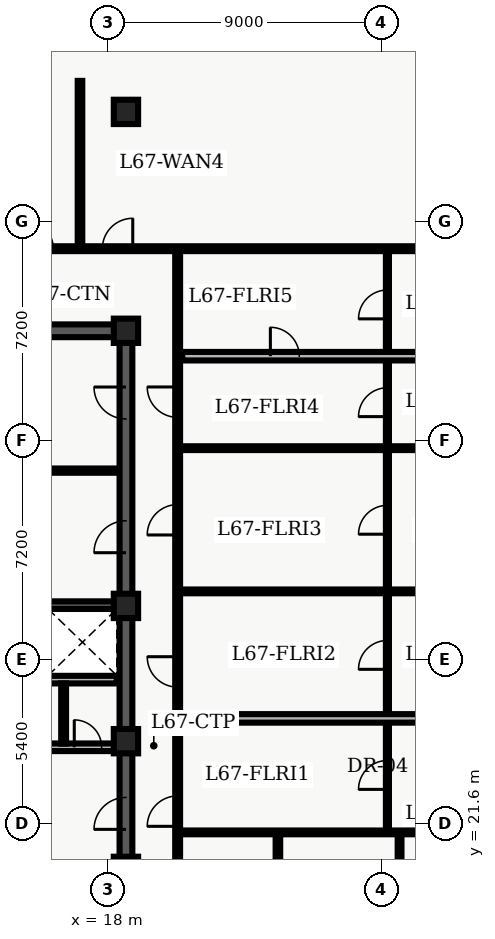
"""IFC4 building model, lengths in metres.
Left out: names, types, materials, properties, quantities, classifications, styles, units other than length and angle.
Written with IfcOpenShell. Run it as: python <this file> out.ifc"""

import sys

from ifc_helpers import new_model, entity, si_unit, converted_unit, direction, frame, origin_with_axes, origin_2d_with_axis, place, context, subcontext, project, spatial, polyline, rectangle, outline, extrude, element, fill, save


model = new_model("IFC4")
c1 = context("Model", 3, precision=1e-05, world=origin_with_axes(), true_north=direction((0.0, 1.0)))
c2 = subcontext(c1, "Body", "Model", "MODEL_VIEW")
j1 = project(units=[si_unit("LENGTHUNIT", "METRE"), converted_unit("PLANEANGLEUNIT", "DEGREE", entity("IfcPlaneAngleMeasure", 0.017), si_unit("PLANEANGLEUNIT", "RADIAN"), dimensions=[0, 0, 0, 0, 0, 0, 0])], contexts=[c1])
p1 = place(None, origin_with_axes())
s1 = spatial("IfcSite", under=j1, at=p1, CompositionType="ELEMENT")
p2 = place(p1, origin_with_axes())
s2 = spatial("IfcBuilding", under=s1, at=p2, CompositionType="ELEMENT")
p3 = place(p2, frame((0.0, 0.0, 272.4), z_axis=(0.0, 0.0, 1.0), x_axis=(1.0, 0.0, 0.0)))
s3 = spatial("IfcBuildingStorey", under=s2, at=p3, CompositionType="ELEMENT", Elevation=272.4)
p4 = place(p3, frame((11.4, 37.8, 0.0), z_axis=(0.0, 0.0, 1.0), x_axis=(1.0, 0.0, 0.0)))
e1 = element("IfcWall", 1, at=p4, inside=s3, PredefinedType="SHEAR", context=c2, shape_type="SweptSolid", body=[
    extrude(outline(polyline([(0.0, -0.21), (7.2, -0.21), (7.2, 0.21), (0.0, 0.21), (0.0, -0.21)])), origin_with_axes(), (0.0, 0.0, 1.0), 3.66),
])
p5 = place(p4, frame((2.625, 0.0, 0.0), z_axis=(0.0, 0.0, 1.0), x_axis=(1.0, 0.0, 0.0)))
e2 = element("IfcOpeningElement", 2, at=p5, cuts=e1, PredefinedType="OPENING", context=c2, shape_type="SweptSolid", body=[
    extrude(rectangle(XDim=1.05, YDim=0.44, at=origin_2d_with_axis()), origin_with_axes(), (0.0, 0.0, 1.0), 2.15),
])
p6 = place(p3, frame((18.6, 10.8, 0.0), z_axis=(0.0, 0.0, 1.0), x_axis=(0.0, 1.0, 0.0)))
e3 = element("IfcWall", 3, at=p6, inside=s3, PredefinedType="SHEAR", context=c2, shape_type="SweptSolid", body=[
    extrude(outline(polyline([(0.0, -0.21), (13.5, -0.21), (13.5, 0.21), (0.0, 0.21), (0.0, -0.21)])), origin_with_axes(), (0.0, 0.0, 1.0), 3.66),
])
p7 = place(p6, frame((1.3, 0.0, 0.0), z_axis=(0.0, 0.0, 1.0), x_axis=(1.0, 0.0, 0.0)))
e4 = element("IfcOpeningElement", 4, at=p7, cuts=e3, PredefinedType="OPENING", context=c2, shape_type="SweptSolid", body=[
    extrude(rectangle(XDim=1.1, YDim=0.44, at=origin_2d_with_axis()), origin_with_axes(), (0.0, 0.0, 1.0), 2.15),
])
p8 = place(p6, frame((3.4, 0.0, 0.0), z_axis=(0.0, 0.0, 1.0), x_axis=(1.0, 0.0, 0.0)))
e5 = element("IfcOpeningElement", 5, at=p8, cuts=e3, PredefinedType="OPENING", context=c2, shape_type="SweptSolid", body=[
    extrude(rectangle(XDim=1.1, YDim=0.44, at=origin_2d_with_axis()), origin_with_axes(), (0.0, 0.0, 1.0), 2.15),
])
p9 = place(p6, frame((11.125, 0.0, 0.0), z_axis=(0.0, 0.0, 1.0), x_axis=(1.0, 0.0, 0.0)))
e6 = element("IfcOpeningElement", 6, at=p9, cuts=e3, PredefinedType="OPENING", context=c2, shape_type="SweptSolid", body=[
    extrude(rectangle(XDim=1.05, YDim=0.44, at=origin_2d_with_axis()), origin_with_axes(), (0.0, 0.0, 1.0), 2.15),
])
p10 = place(p6, frame((6.675, 0.0, 0.0), z_axis=(0.0, 0.0, 1.0), x_axis=(1.0, 0.0, 0.0)))
e7 = element("IfcOpeningElement", 7, at=p10, cuts=e3, PredefinedType="OPENING", context=c2, shape_type="SweptSolid", body=[
    extrude(rectangle(XDim=0.95, YDim=0.44, at=origin_2d_with_axis()), origin_with_axes(), (0.0, 0.0, 1.0), 2.15),
])
p11 = place(p3, frame((18.6, 24.3, 0.0), z_axis=(0.0, 0.0, 1.0), x_axis=(0.0, 1.0, 0.0)))
e8 = element("IfcWall", 8, at=p11, inside=s3, PredefinedType="SHEAR", context=c2, shape_type="SweptSolid", body=[
    extrude(outline(polyline([(0.0, -0.21), (13.5, -0.21), (13.5, 0.21), (0.0, 0.21), (0.0, -0.21)])), origin_with_axes(), (0.0, 0.0, 1.0), 3.66),
])
p12 = place(p11, frame((6.725, 0.0, 0.0), z_axis=(0.0, 0.0, 1.0), x_axis=(1.0, 0.0, 0.0)))
e9 = element("IfcOpeningElement", 9, at=p12, cuts=e8, PredefinedType="OPENING", context=c2, shape_type="SweptSolid", body=[
    extrude(rectangle(XDim=1.05, YDim=0.44, at=origin_2d_with_axis()), origin_with_axes(), (0.0, 0.0, 1.0), 2.15),
])
p13 = place(p11, frame((11.125, 0.0, 0.0), z_axis=(0.0, 0.0, 1.0), x_axis=(1.0, 0.0, 0.0)))
e10 = element("IfcOpeningElement", 10, at=p13, cuts=e8, PredefinedType="OPENING", context=c2, shape_type="SweptSolid", body=[
    extrude(rectangle(XDim=1.05, YDim=0.44, at=origin_2d_with_axis()), origin_with_axes(), (0.0, 0.0, 1.0), 2.15),
])
p14 = place(p3, frame((11.61, 28.775, 0.0), z_axis=(0.0, 0.0, 1.0), x_axis=(1.0, 0.0, 0.0)))
e11 = element("IfcWall", 11, at=p14, inside=s3, PredefinedType="SHEAR", context=c2, shape_type="SweptSolid", body=[
    extrude(outline(polyline([(0.0, -0.125), (6.78, -0.125), (6.78, 0.125), (0.0, 0.125), (0.0, -0.125)])), origin_with_axes(), (0.0, 0.0, 1.0), 3.66),
])
p15 = place(p3, frame((11.7, 24.1, 0.0), z_axis=(0.0, 0.0, 1.0), x_axis=(1.0, 0.0, 0.0)))
e12 = element("IfcWall", 12, at=p15, inside=s3, PredefinedType="SOLIDWALL", context=c2, shape_type="SweptSolid", body=[
    extrude(outline(polyline([(0.0, -0.125), (6.6, -0.125), (6.6, 0.125), (0.0, 0.125), (0.0, -0.125)])), origin_with_axes(), (0.0, 0.0, 1.0), 2.7),
])
p16 = place(p15, frame((3.6, 0.0, 0.0), z_axis=(0.0, 0.0, 1.0), x_axis=(1.0, 0.0, 0.0)))
e13 = element("IfcOpeningElement", 13, at=p16, cuts=e12, PredefinedType="OPENING", context=c2, shape_type="SweptSolid", body=[
    extrude(rectangle(XDim=0.9, YDim=0.27, at=origin_2d_with_axis()), origin_with_axes(), (0.0, 0.0, 1.0), 2.15),
])
p17 = place(p15, frame((5.65, 0.0, 0.0), z_axis=(0.0, 0.0, 1.0), x_axis=(1.0, 0.0, 0.0)))
e14 = element("IfcOpeningElement", 14, at=p17, cuts=e12, PredefinedType="OPENING", context=c2, shape_type="SweptSolid", body=[
    extrude(rectangle(XDim=0.9, YDim=0.27, at=origin_2d_with_axis()), origin_with_axes(), (0.0, 0.0, 1.0), 2.15),
])
p18 = place(p3, frame((11.7, 26.325, 0.0), z_axis=(0.0, 0.0, 1.0), x_axis=(1.0, 0.0, 0.0)))
e15 = element("IfcWall", 15, at=p18, inside=s3, PredefinedType="SOLIDWALL", context=c2, shape_type="SweptSolid", body=[
    extrude(outline(polyline([(0.0, -0.125), (6.6, -0.125), (6.6, 0.125), (0.0, 0.125), (0.0, -0.125)])), origin_with_axes(), (0.0, 0.0, 1.0), 2.7),
])
p19 = place(p18, frame((3.5, 0.0, 0.0), z_axis=(0.0, 0.0, 1.0), x_axis=(1.0, 0.0, 0.0)))
e16 = element("IfcOpeningElement", 16, at=p19, cuts=e15, PredefinedType="OPENING", context=c2, shape_type="SweptSolid", body=[
    extrude(rectangle(XDim=0.9, YDim=0.27, at=origin_2d_with_axis()), origin_with_axes(), (0.0, 0.0, 1.0), 2.15),
])
for number, where, z_axis, x_axis in (
    (17, (18.6, 20.1, 0.0), (0.0, 0.0, 1.0), (1.0, 0.0, 0.0)),
    (18, (18.6, 24.3, 0.0), (0.0, 0.0, 1.0), (1.0, 0.0, 0.0)),
    (19, (18.6, 28.75, 0.0), (0.0, 0.0, 1.0), (1.0, 0.0, 0.0)),
    (20, (18.6, 37.8, 0.0), (0.0, 0.0, 1.0), (1.0, 0.0, 0.0)),
    (21, (18.6, 45.0, 0.0), (0.0, 0.0, 1.0), (1.0, 0.0, 0.0)),
):
    element("IfcColumn", number, at=place(p3, frame(where, z_axis=z_axis, x_axis=x_axis)), inside=s3, PredefinedType="COLUMN", context=c2, shape_type="SweptSolid", body=[
        extrude(rectangle(XDim=0.8, YDim=0.8, at=origin_2d_with_axis()), origin_with_axes(), (0.0, 0.0, 1.0), 3.9),
    ])
p20 = place(p3, frame((16.55, 24.22, 0.0), z_axis=(0.0, 0.0, 1.0), x_axis=(0.0, 1.0, 0.0)))
e22 = element("IfcWall", 22, at=p20, inside=s3, PredefinedType="PARTITIONING", context=c2, shape_type="SweptSolid", body=[
    extrude(outline(polyline([(0.0, -0.08), (1.98, -0.08), (1.98, 0.08), (0.0, 0.08), (0.0, -0.08)])), origin_with_axes(), (0.0, 0.0, 1.0), 2.7),
])
p21 = place(p3, frame((15.84, 33.2, 0.0), z_axis=(0.0, 0.0, 1.0), x_axis=(1.0, 0.0, 0.0)))
e23 = element("IfcWall", 23, at=p21, inside=s3, PredefinedType="PARTITIONING", context=c2, shape_type="SweptSolid", body=[
    extrude(outline(polyline([(0.0, -0.07), (2.46, -0.07), (2.46, 0.07), (0.0, 0.07), (0.0, -0.07)])), origin_with_axes(), (0.0, 0.0, 1.0), 2.7),
])
p22 = place(p3, frame((8.135, 40.5, 0.0), z_axis=(0.0, 0.0, 1.0), x_axis=(1.0, 0.0, 0.0)))
e24 = element("IfcWall", 24, at=p22, inside=s3, PredefinedType="PARTITIONING", context=c2, shape_type="SweptSolid", body=[
    extrude(outline(polyline([(0.0, -0.08), (23.93, -0.08), (23.93, 0.08), (0.0, 0.08), (0.0, -0.08)])), origin_with_axes(), (0.0, 0.0, 1.0), 2.7),
])
p23 = place(p22, frame((0.76, 0.0, 0.0), z_axis=(0.0, 0.0, 1.0), x_axis=(1.0, 0.0, 0.0)))
e25 = element("IfcOpeningElement", 25, at=p23, cuts=e24, PredefinedType="OPENING", context=c2, shape_type="SweptSolid", body=[
    extrude(rectangle(XDim=1.0, YDim=0.18, at=origin_2d_with_axis()), origin_with_axes(), (0.0, 0.0, 1.0), 2.15),
])
p24 = place(p22, frame((4.729, 0.0, 0.0), z_axis=(0.0, 0.0, 1.0), x_axis=(1.0, 0.0, 0.0)))
e26 = element("IfcOpeningElement", 26, at=p24, cuts=e24, PredefinedType="OPENING", context=c2, shape_type="SweptSolid", body=[
    extrude(rectangle(XDim=1.0, YDim=0.18, at=origin_2d_with_axis()), origin_with_axes(), (0.0, 0.0, 1.0), 2.15),
])
p25 = place(p22, frame((7.574, 0.0, 0.0), z_axis=(0.0, 0.0, 1.0), x_axis=(1.0, 0.0, 0.0)))
e27 = element("IfcOpeningElement", 27, at=p25, cuts=e24, PredefinedType="OPENING", context=c2, shape_type="SweptSolid", body=[
    extrude(rectangle(XDim=1.0, YDim=0.18, at=origin_2d_with_axis()), origin_with_axes(), (0.0, 0.0, 1.0), 2.15),
])
p26 = place(p22, frame((10.189, 0.0, 0.0), z_axis=(0.0, 0.0, 1.0), x_axis=(1.0, 0.0, 0.0)))
e28 = element("IfcOpeningElement", 28, at=p26, cuts=e24, PredefinedType="OPENING", context=c2, shape_type="SweptSolid", body=[
    extrude(rectangle(XDim=1.0, YDim=0.18, at=origin_2d_with_axis()), origin_with_axes(), (0.0, 0.0, 1.0), 2.15),
])
p27 = place(p3, frame((20.3, 7.8, 0.0), z_axis=(0.0, 0.0, 1.0), x_axis=(0.0, 1.0, 0.0)))
e29 = element("IfcWall", 29, at=p27, inside=s3, PredefinedType="PARTITIONING", context=c2, shape_type="SweptSolid", body=[
    extrude(outline(polyline([(0.0, -0.08), (32.7, -0.08), (32.7, 0.08), (0.0, 0.08), (0.0, -0.08)])), origin_with_axes(), (0.0, 0.0, 1.0), 2.7),
])
p28 = place(p27, frame((14.2, 0.0, 0.0), z_axis=(0.0, 0.0, 1.0), x_axis=(1.0, 0.0, 0.0)))
e30 = element("IfcOpeningElement", 30, at=p28, cuts=e29, PredefinedType="OPENING", context=c2, shape_type="SweptSolid", body=[
    extrude(rectangle(XDim=1.0, YDim=0.18, at=origin_2d_with_axis()), origin_with_axes(), (0.0, 0.0, 1.0), 2.15),
])
p29 = place(p27, frame((18.779, 0.0, 0.0), z_axis=(0.0, 0.0, 1.0), x_axis=(1.0, 0.0, 0.0)))
e31 = element("IfcOpeningElement", 31, at=p29, cuts=e29, PredefinedType="OPENING", context=c2, shape_type="SweptSolid", body=[
    extrude(rectangle(XDim=1.0, YDim=0.18, at=origin_2d_with_axis()), origin_with_axes(), (0.0, 0.0, 1.0), 2.15),
])
p30 = place(p27, frame((23.784, 0.0, 0.0), z_axis=(0.0, 0.0, 1.0), x_axis=(1.0, 0.0, 0.0)))
e32 = element("IfcOpeningElement", 32, at=p30, cuts=e29, PredefinedType="OPENING", context=c2, shape_type="SweptSolid", body=[
    extrude(rectangle(XDim=1.0, YDim=0.18, at=origin_2d_with_axis()), origin_with_axes(), (0.0, 0.0, 1.0), 2.15),
])
p31 = place(p27, frame((27.651, 0.0, 0.0), z_axis=(0.0, 0.0, 1.0), x_axis=(1.0, 0.0, 0.0)))
e33 = element("IfcOpeningElement", 33, at=p31, cuts=e29, PredefinedType="OPENING", context=c2, shape_type="SweptSolid", body=[
    extrude(rectangle(XDim=1.0, YDim=0.18, at=origin_2d_with_axis()), origin_with_axes(), (0.0, 0.0, 1.0), 2.15),
])
p32 = place(p27, frame((5.475, 0.0, 0.0), z_axis=(0.0, 0.0, 1.0), x_axis=(1.0, 0.0, 0.0)))
e34 = element("IfcOpeningElement", 34, at=p32, cuts=e29, PredefinedType="OPENING", context=c2, shape_type="SweptSolid", body=[
    extrude(rectangle(XDim=1.05, YDim=0.18, at=origin_2d_with_axis()), origin_with_axes(), (0.0, 0.0, 1.0), 2.15),
])
p33 = place(p3, frame((17.088, 40.6, 0.0), z_axis=(0.0, 0.0, 1.0), x_axis=(0.0, 1.0, 0.0)))
e35 = element("IfcWall", 35, at=p33, inside=s3, PredefinedType="PARTITIONING", context=c2, shape_type="SweptSolid", body=[
    extrude(outline(polyline([(0.0, -0.075), (5.42, -0.075), (5.42, 0.075), (0.0, 0.075), (0.0, -0.075)])), origin_with_axes(), (0.0, 0.0, 1.0), 2.7),
])
p34 = place(p3, frame((27.2, 21.4, 0.0), z_axis=(0.0, 0.0, 1.0), x_axis=(0.0, 1.0, 0.0)))
e36 = element("IfcWall", 36, at=p34, inside=s3, PredefinedType="PARTITIONING", context=c2, shape_type="SweptSolid", body=[
    extrude(outline(polyline([(0.0, -0.05), (18.9, -0.05), (18.9, 0.05), (0.0, 0.05), (0.0, -0.05)])), origin_with_axes(), (0.0, 0.0, 1.0), 2.7),
])
p35 = place(p34, frame((1.79, 0.0, 0.0), z_axis=(0.0, 0.0, 1.0), x_axis=(1.0, 0.0, 0.0)))
e37 = element("IfcOpeningElement", 37, at=p35, cuts=e36, PredefinedType="OPENING", context=c2, shape_type="SweptSolid", body=[
    extrude(rectangle(XDim=0.95, YDim=0.12, at=origin_2d_with_axis()), origin_with_axes(), (0.0, 0.0, 1.0), 2.15),
])
p36 = place(p34, frame((5.739, 0.0, 0.0), z_axis=(0.0, 0.0, 1.0), x_axis=(1.0, 0.0, 0.0)))
e38 = element("IfcOpeningElement", 38, at=p36, cuts=e36, PredefinedType="OPENING", context=c2, shape_type="SweptSolid", body=[
    extrude(rectangle(XDim=0.95, YDim=0.12, at=origin_2d_with_axis()), origin_with_axes(), (0.0, 0.0, 1.0), 2.15),
])
p37 = place(p34, frame((10.184, 0.0, 0.0), z_axis=(0.0, 0.0, 1.0), x_axis=(1.0, 0.0, 0.0)))
e39 = element("IfcOpeningElement", 39, at=p37, cuts=e36, PredefinedType="OPENING", context=c2, shape_type="SweptSolid", body=[
    extrude(rectangle(XDim=0.95, YDim=0.12, at=origin_2d_with_axis()), origin_with_axes(), (0.0, 0.0, 1.0), 2.15),
])
p38 = place(p34, frame((14.052, 0.0, 0.0), z_axis=(0.0, 0.0, 1.0), x_axis=(1.0, 0.0, 0.0)))
e40 = element("IfcOpeningElement", 40, at=p38, cuts=e36, PredefinedType="OPENING", context=c2, shape_type="SweptSolid", body=[
    extrude(rectangle(XDim=0.95, YDim=0.12, at=origin_2d_with_axis()), origin_with_axes(), (0.0, 0.0, 1.0), 2.15),
])
p39 = place(p34, frame((17.267, 0.0, 0.0), z_axis=(0.0, 0.0, 1.0), x_axis=(1.0, 0.0, 0.0)))
e41 = element("IfcOpeningElement", 41, at=p39, cuts=e36, PredefinedType="OPENING", context=c2, shape_type="SweptSolid", body=[
    extrude(rectangle(XDim=0.95, YDim=0.12, at=origin_2d_with_axis()), origin_with_axes(), (0.0, 0.0, 1.0), 2.15),
])
p40 = place(p3, frame((20.45, 25.05, 0.0), z_axis=(0.0, 0.0, 1.0), x_axis=(1.0, 0.0, 0.0)))
e42 = element("IfcWall", 42, at=p40, inside=s3, PredefinedType="PARTITIONING", context=c2, shape_type="SweptSolid", body=[
    extrude(outline(polyline([(0.0, -0.14), (11.615, -0.14), (11.615, 0.14), (0.0, 0.14), (0.0, -0.14)])), origin_with_axes(), (0.0, 0.0, 1.0), 2.7),
])
for number, where, z_axis, x_axis in (
    (43, (20.45, 29.228, 0.0), (0.0, 0.0, 1.0), (1.0, 0.0, 0.0)),
    (44, (20.45, 33.939, 0.0), (0.0, 0.0, 1.0), (1.0, 0.0, 0.0)),
):
    element("IfcWall", number, at=place(p3, frame(where, z_axis=z_axis, x_axis=x_axis)), inside=s3, PredefinedType="PARTITIONING", context=c2, shape_type="SweptSolid", body=[
        extrude(outline(polyline([(0.0, -0.062), (11.615, -0.062), (11.615, 0.062), (0.0, 0.062), (0.0, -0.062)])), origin_with_axes(), (0.0, 0.0, 1.0), 2.7),
    ])
p41 = place(p3, frame((20.45, 36.964, 0.0), z_axis=(0.0, 0.0, 1.0), x_axis=(1.0, 0.0, 0.0)))
e45 = element("IfcWall", 45, at=p41, inside=s3, PredefinedType="PARTITIONING", context=c2, shape_type="SweptSolid", body=[
    extrude(outline(polyline([(0.0, -0.14), (11.615, -0.14), (11.615, 0.14), (0.0, 0.14), (0.0, -0.14)])), origin_with_axes(), (0.0, 0.0, 1.0), 2.7),
])
p42 = place(p41, frame((3.375, 0.0, 0.0), z_axis=(0.0, 0.0, 1.0), x_axis=(1.0, 0.0, 0.0)))
e46 = element("IfcOpeningElement", 46, at=p42, cuts=e45, PredefinedType="OPENING", context=c2, shape_type="SweptSolid", body=[
    extrude(rectangle(XDim=0.95, YDim=0.3, at=origin_2d_with_axis()), origin_with_axes(), (0.0, 0.0, 1.0), 2.15),
])
p43 = place(p3, frame((23.598, 14.62, 0.0), z_axis=(0.0, 0.0, 1.0), x_axis=(0.0, 1.0, 0.0)))
e47 = element("IfcWall", 47, at=p43, inside=s3, PredefinedType="PARTITIONING", context=c2, shape_type="SweptSolid", body=[
    extrude(outline(polyline([(0.0, -0.075), (6.6, -0.075), (6.6, 0.075), (0.0, 0.075), (0.0, -0.075)])), origin_with_axes(), (0.0, 0.0, 1.0), 2.7),
])
p44 = place(p3, frame((27.6, 14.62, 0.0), z_axis=(0.0, 0.0, 1.0), x_axis=(0.0, 1.0, 0.0)))
e48 = element("IfcWall", 48, at=p44, inside=s3, PredefinedType="PARTITIONING", context=c2, shape_type="SweptSolid", body=[
    extrude(outline(polyline([(0.0, -0.062), (6.6, -0.062), (6.6, 0.062), (0.0, 0.062), (0.0, -0.062)])), origin_with_axes(), (0.0, 0.0, 1.0), 2.7),
])
p45 = place(p3, frame((20.3, 21.3, 0.0), z_axis=(0.0, 0.0, 1.0), x_axis=(1.0, 0.0, 0.0)))
e49 = element("IfcWall", 49, at=p45, inside=s3, PredefinedType="PARTITIONING", context=c2, shape_type="SweptSolid", body=[
    extrude(outline(polyline([(0.0, -0.062), (11.765, -0.062), (11.765, 0.062), (0.0, 0.062), (0.0, -0.062)])), origin_with_axes(), (0.0, 0.0, 1.0), 2.7),
])
p46 = place(p6, frame((11.125, 0.0, 0.0), z_axis=(0.0, 0.0, 1.0), x_axis=(1.0, 0.0, 0.0)))
e50 = element("IfcDoor", 50, at=p46, inside=s3, OperationType="SINGLE_SWING_LEFT", PredefinedType="DOOR", context=c2, shape_type="SweptSolid", body=[
    extrude(rectangle(XDim=1.05, YDim=0.09, at=origin_2d_with_axis()), origin_with_axes(), (0.0, 0.0, 1.0), 2.15),
])
fill(e6, e50)
p47 = place(p15, frame((5.65, 0.0, 0.0), z_axis=(0.0, 0.0, 1.0), x_axis=(1.0, 0.0, 0.0)))
e51 = element("IfcDoor", 51, at=p47, inside=s3, OperationType="SINGLE_SWING_LEFT", PredefinedType="DOOR", context=c2, shape_type="SweptSolid", body=[
    extrude(rectangle(XDim=0.9, YDim=0.09, at=origin_2d_with_axis()), origin_with_axes(), (0.0, 0.0, 1.0), 2.15),
])
fill(e14, e51)
p48 = place(p11, frame((6.725, 0.0, 0.0), z_axis=(0.0, 0.0, 1.0), x_axis=(1.0, 0.0, 0.0)))
e52 = element("IfcDoor", 52, at=p48, inside=s3, OperationType="SINGLE_SWING_LEFT", PredefinedType="DOOR", context=c2, shape_type="SweptSolid", body=[
    extrude(rectangle(XDim=1.05, YDim=0.09, at=origin_2d_with_axis()), origin_with_axes(), (0.0, 0.0, 1.0), 2.15),
])
fill(e9, e52)
p49 = place(p11, frame((11.125, 0.0, 0.0), z_axis=(0.0, 0.0, 1.0), x_axis=(1.0, 0.0, 0.0)))
e53 = element("IfcDoor", 53, at=p49, inside=s3, OperationType="SINGLE_SWING_RIGHT", PredefinedType="DOOR", context=c2, shape_type="SweptSolid", body=[
    extrude(rectangle(XDim=1.05, YDim=0.09, at=origin_2d_with_axis()), origin_with_axes(), (0.0, 0.0, 1.0), 2.15),
])
fill(e10, e53)
p50 = place(p22, frame((7.574, 0.0, 0.0), z_axis=(0.0, 0.0, 1.0), x_axis=(1.0, 0.0, 0.0)))
e54 = element("IfcDoor", 54, at=p50, inside=s3, OperationType="SINGLE_SWING_LEFT", PredefinedType="DOOR", context=c2, shape_type="SweptSolid", body=[
    extrude(rectangle(XDim=1.0, YDim=0.09, at=origin_2d_with_axis()), origin_with_axes(), (0.0, 0.0, 1.0), 2.15),
])
fill(e27, e54)
p51 = place(p22, frame((10.189, 0.0, 0.0), z_axis=(0.0, 0.0, 1.0), x_axis=(1.0, 0.0, 0.0)))
e55 = element("IfcDoor", 55, at=p51, inside=s3, OperationType="SINGLE_SWING_RIGHT", PredefinedType="DOOR", context=c2, shape_type="SweptSolid", body=[
    extrude(rectangle(XDim=1.0, YDim=0.09, at=origin_2d_with_axis()), origin_with_axes(), (0.0, 0.0, 1.0), 2.15),
])
fill(e28, e55)
p52 = place(p34, frame((1.79, 0.0, 0.0), z_axis=(0.0, 0.0, 1.0), x_axis=(1.0, 0.0, 0.0)))
e56 = element("IfcDoor", 56, at=p52, inside=s3, OperationType="SINGLE_SWING_LEFT", PredefinedType="DOOR", context=c2, shape_type="SweptSolid", body=[
    extrude(rectangle(XDim=0.95, YDim=0.06, at=origin_2d_with_axis()), origin_with_axes(), (0.0, 0.0, 1.0), 2.15),
])
fill(e37, e56)
p53 = place(p27, frame((14.2, 0.0, 0.0), z_axis=(0.0, 0.0, 1.0), x_axis=(1.0, 0.0, 0.0)))
e57 = element("IfcDoor", 57, at=p53, inside=s3, OperationType="SINGLE_SWING_LEFT", PredefinedType="DOOR", context=c2, shape_type="SweptSolid", body=[
    extrude(rectangle(XDim=1.0, YDim=0.09, at=origin_2d_with_axis()), origin_with_axes(), (0.0, 0.0, 1.0), 2.15),
])
fill(e30, e57)
p54 = place(p34, frame((5.739, 0.0, 0.0), z_axis=(0.0, 0.0, 1.0), x_axis=(1.0, 0.0, 0.0)))
e58 = element("IfcDoor", 58, at=p54, inside=s3, OperationType="SINGLE_SWING_LEFT", PredefinedType="DOOR", context=c2, shape_type="SweptSolid", body=[
    extrude(rectangle(XDim=0.95, YDim=0.06, at=origin_2d_with_axis()), origin_with_axes(), (0.0, 0.0, 1.0), 2.15),
])
fill(e38, e58)
p55 = place(p27, frame((18.779, 0.0, 0.0), z_axis=(0.0, 0.0, 1.0), x_axis=(1.0, 0.0, 0.0)))
e59 = element("IfcDoor", 59, at=p55, inside=s3, OperationType="SINGLE_SWING_RIGHT", PredefinedType="DOOR", context=c2, shape_type="SweptSolid", body=[
    extrude(rectangle(XDim=1.0, YDim=0.09, at=origin_2d_with_axis()), origin_with_axes(), (0.0, 0.0, 1.0), 2.15),
])
fill(e31, e59)
p56 = place(p34, frame((10.184, 0.0, 0.0), z_axis=(0.0, 0.0, 1.0), x_axis=(1.0, 0.0, 0.0)))
e60 = element("IfcDoor", 60, at=p56, inside=s3, OperationType="SINGLE_SWING_LEFT", PredefinedType="DOOR", context=c2, shape_type="SweptSolid", body=[
    extrude(rectangle(XDim=0.95, YDim=0.06, at=origin_2d_with_axis()), origin_with_axes(), (0.0, 0.0, 1.0), 2.15),
])
fill(e39, e60)
p57 = place(p27, frame((23.784, 0.0, 0.0), z_axis=(0.0, 0.0, 1.0), x_axis=(1.0, 0.0, 0.0)))
e61 = element("IfcDoor", 61, at=p57, inside=s3, OperationType="SINGLE_SWING_LEFT", PredefinedType="DOOR", context=c2, shape_type="SweptSolid", body=[
    extrude(rectangle(XDim=1.0, YDim=0.09, at=origin_2d_with_axis()), origin_with_axes(), (0.0, 0.0, 1.0), 2.15),
])
fill(e32, e61)
p58 = place(p34, frame((14.052, 0.0, 0.0), z_axis=(0.0, 0.0, 1.0), x_axis=(1.0, 0.0, 0.0)))
e62 = element("IfcDoor", 62, at=p58, inside=s3, OperationType="SINGLE_SWING_LEFT", PredefinedType="DOOR", context=c2, shape_type="SweptSolid", body=[
    extrude(rectangle(XDim=0.95, YDim=0.06, at=origin_2d_with_axis()), origin_with_axes(), (0.0, 0.0, 1.0), 2.15),
])
fill(e40, e62)
p59 = place(p27, frame((27.651, 0.0, 0.0), z_axis=(0.0, 0.0, 1.0), x_axis=(1.0, 0.0, 0.0)))
e63 = element("IfcDoor", 63, at=p59, inside=s3, OperationType="SINGLE_SWING_RIGHT", PredefinedType="DOOR", context=c2, shape_type="SweptSolid", body=[
    extrude(rectangle(XDim=1.0, YDim=0.09, at=origin_2d_with_axis()), origin_with_axes(), (0.0, 0.0, 1.0), 2.15),
])
fill(e33, e63)
p60 = place(p34, frame((17.267, 0.0, 0.0), z_axis=(0.0, 0.0, 1.0), x_axis=(1.0, 0.0, 0.0)))
e64 = element("IfcDoor", 64, at=p60, inside=s3, OperationType="SINGLE_SWING_LEFT", PredefinedType="DOOR", context=c2, shape_type="SweptSolid", body=[
    extrude(rectangle(XDim=0.95, YDim=0.06, at=origin_2d_with_axis()), origin_with_axes(), (0.0, 0.0, 1.0), 2.15),
])
fill(e41, e64)
p61 = place(p41, frame((3.375, 0.0, 0.0), z_axis=(0.0, 0.0, 1.0), x_axis=(1.0, 0.0, 0.0)))
e65 = element("IfcDoor", 65, at=p61, inside=s3, OperationType="SINGLE_SWING_LEFT", PredefinedType="DOOR", context=c2, shape_type="SweptSolid", body=[
    extrude(rectangle(XDim=0.95, YDim=0.09, at=origin_2d_with_axis()), origin_with_axes(), (0.0, 0.0, 1.0), 2.15),
])
fill(e46, e65)
save(model, sys.argv[1])
